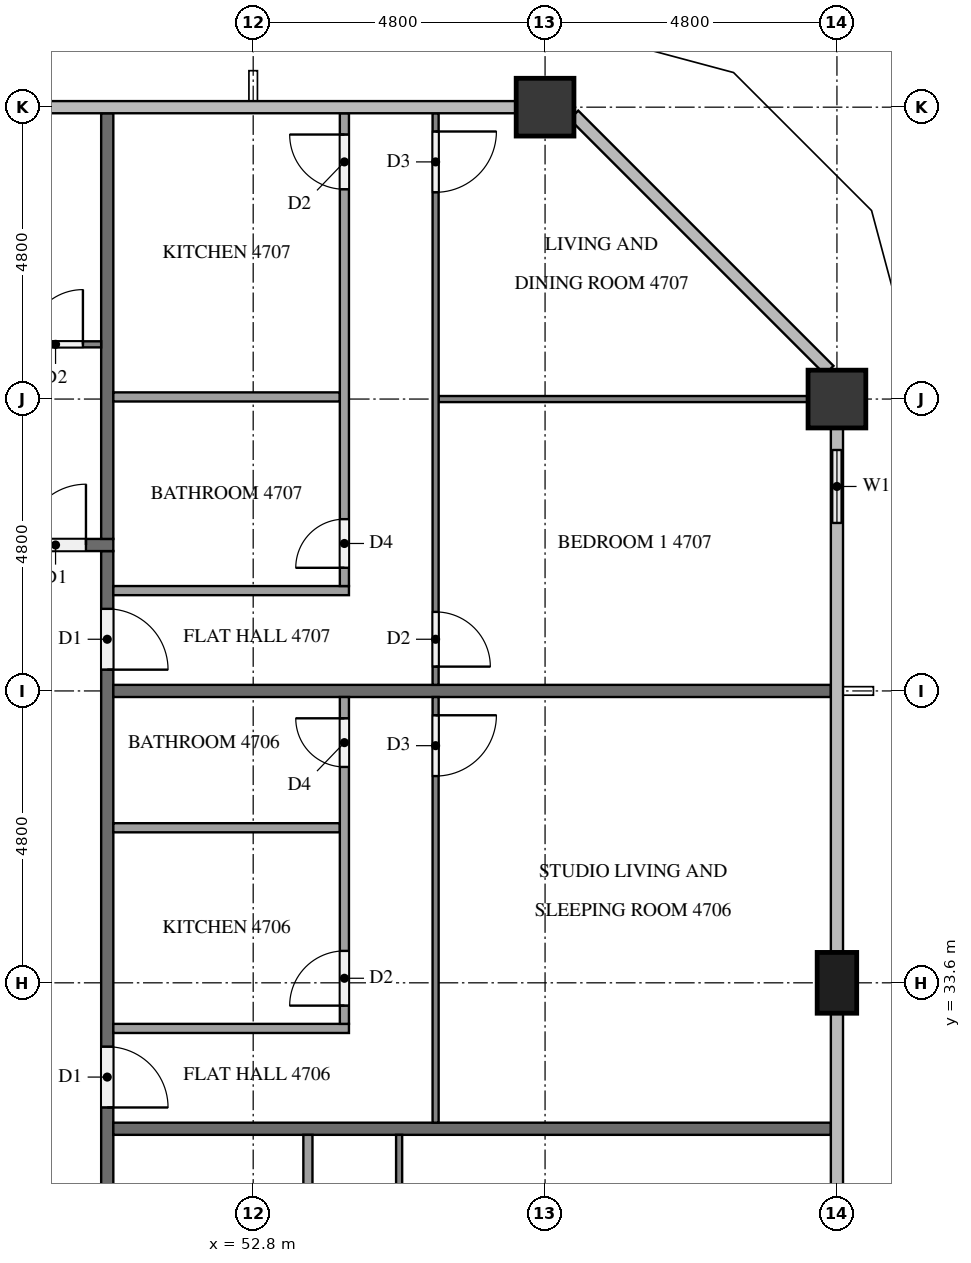
"""IFC4 building model, lengths in metres.
Left out: names, types, materials, properties, quantities, classifications, styles, units other than length and angle.
Written with IfcOpenShell. Run it as: python <this file> out.ifc"""

import sys

from ifc_helpers import new_model, si_unit, direction, frame, frame_2d, origin, origin_2d, place, context, subcontext, project, spatial, rectangle, extrude, element, fill, save


model = new_model("IFC4")
c1 = context("Model", 3, precision=1e-05, world=origin(), true_north=direction((0.0, 1.0)))
c2 = subcontext(c1, "Body", "Model", "MODEL_VIEW")
j1 = project(units=[si_unit("LENGTHUNIT", "METRE"), si_unit("PLANEANGLEUNIT", "RADIAN")], contexts=[c1])
p1 = place(None, origin())
s1 = spatial("IfcSite", under=j1, at=p1, CompositionType="ELEMENT")
p2 = place(p1, origin())
s2 = spatial("IfcBuilding", under=s1, at=p2, CompositionType="ELEMENT")
p3 = place(p2, frame((0.0, 0.0, 182.4)))
s3 = spatial("IfcBuildingStorey", under=s2, at=p3, CompositionType="ELEMENT", Elevation=182.4)
p4 = place(p3, frame((62.4, 33.6, 0.0), z_axis=(0.0, 0.0, 1.0), x_axis=(0.0, 1.0, 0.0)))
e1 = element("IfcColumn", 1, at=p4, inside=s3, PredefinedType="COLUMN", context=c2, shape_type="SweptSolid", body=[
    extrude(rectangle(XDim=1.0, YDim=0.65, at=origin_2d()), origin(), (0.0, 0.0, 1.0), 3.2),
])
for number, where, z_axis, x_axis in (
    (2, (62.4, 43.2, 0.0), (0.0, 0.0, 1.0), (1.0, 0.0, 0.0)),
    (3, (57.6, 48.0, 0.0), (0.0, 0.0, 1.0), (1.0, 0.0, 0.0)),
):
    element("IfcColumn", number, at=place(p3, frame(where, z_axis=z_axis, x_axis=x_axis)), inside=s3, PredefinedType="COLUMN", context=c2, shape_type="SweptSolid", body=[
        extrude(rectangle(XDim=0.95, YDim=0.95, at=origin_2d()), origin(), (0.0, 0.0, 1.0), 3.2),
    ])
p5 = place(p3, frame((62.4, 40.8, 0.0), z_axis=(0.0, 0.0, 1.0), x_axis=(0.0, 1.0, 0.0)))
e4 = element("IfcWall", 4, at=p5, inside=s3, PredefinedType="SOLIDWALL", context=c2, shape_type="SweptSolid", body=[
    extrude(rectangle(XDim=1.925, YDim=0.15, at=frame_2d((0.962, 0.0))), origin(), (0.0, 0.0, 1.0), 3.2),
])
p6 = place(p5, frame((0.363, 0.0, 0.9)))
e5 = element("IfcOpeningElement", 5, at=p6, cuts=e4, PredefinedType="OPENING", context=c2, shape_type="SweptSolid", body=[
    extrude(rectangle(XDim=1.2, YDim=1.4, at=frame_2d((0.6, 0.7))), frame((0.0, 0.085, 0.0), z_axis=(0.0, -1.0, 0.0), x_axis=(1.0, 0.0, 0.0)), (0.0, 0.0, 1.0), 0.17),
])
p7 = place(p3, frame((50.4, 40.7, 0.0), z_axis=(0.0, 0.0, 1.0), x_axis=(0.0, -1.0, 0.0)))
e6 = element("IfcWall", 6, at=p7, inside=s3, PredefinedType="PARTITIONING", context=c2, shape_type="SweptSolid", body=[
    extrude(rectangle(XDim=28.6, YDim=0.2, at=frame_2d((14.3, 0.0))), origin(), (0.0, 0.0, 1.0), 3.2),
])
p8 = place(p7, frame((27.3, 0.0, 0.0)))
e7 = element("IfcOpeningElement", 7, at=p8, cuts=e6, PredefinedType="OPENING", context=c2, shape_type="SweptSolid", body=[
    extrude(rectangle(XDim=1.1, YDim=2.1, at=frame_2d((0.55, 1.05))), frame((0.0, 0.11, 0.0), z_axis=(0.0, -1.0, 0.0), x_axis=(1.0, 0.0, 0.0)), (0.0, 0.0, 1.0), 0.22),
])
p9 = place(p7, frame((8.15, 0.0, 0.0)))
e8 = element("IfcOpeningElement", 8, at=p9, cuts=e6, PredefinedType="OPENING", context=c2, shape_type="SweptSolid", body=[
    extrude(rectangle(XDim=1.0, YDim=2.1, at=frame_2d((0.5, 1.05))), frame((0.0, 0.11, 0.0), z_axis=(0.0, -1.0, 0.0), x_axis=(1.0, 0.0, 0.0)), (0.0, 0.0, 1.0), 0.22),
])
p10 = place(p7, frame((0.95, 0.0, 0.0)))
e9 = element("IfcOpeningElement", 9, at=p10, cuts=e6, PredefinedType="OPENING", context=c2, shape_type="SweptSolid", body=[
    extrude(rectangle(XDim=1.0, YDim=2.1, at=frame_2d((0.5, 1.05))), frame((0.0, 0.11, 0.0), z_axis=(0.0, -1.0, 0.0), x_axis=(1.0, 0.0, 0.0)), (0.0, 0.0, 1.0), 0.22),
])
p11 = place(p3, frame((11.9, 40.8, 0.0), z_axis=(0.0, 0.0, 1.0), x_axis=(1.0, 0.0, 0.0)))
e10 = element("IfcWall", 10, at=p11, inside=s3, PredefinedType="PARTITIONING", context=c2, shape_type="SweptSolid", body=[
    extrude(rectangle(XDim=38.6, YDim=0.2, at=frame_2d((19.3, 0.0))), origin(), (0.0, 0.0, 1.0), 3.2),
])
p12 = place(p11, frame((37.15, 0.0, 0.0)))
e11 = element("IfcOpeningElement", 11, at=p12, cuts=e10, PredefinedType="OPENING", context=c2, shape_type="SweptSolid", body=[
    extrude(rectangle(XDim=1.0, YDim=2.1, at=frame_2d((0.5, 1.05))), frame((0.0, 0.11, 0.0), z_axis=(0.0, -1.0, 0.0), x_axis=(1.0, 0.0, 0.0)), (0.0, 0.0, 1.0), 0.22),
])
p13 = place(p11, frame((20.35, 0.0, 0.0)))
e12 = element("IfcOpeningElement", 12, at=p13, cuts=e10, PredefinedType="OPENING", context=c2, shape_type="SweptSolid", body=[
    extrude(rectangle(XDim=1.0, YDim=2.1, at=frame_2d((0.5, 1.05))), frame((0.0, 0.11, 0.0), z_axis=(0.0, -1.0, 0.0), x_axis=(1.0, 0.0, 0.0)), (0.0, 0.0, 1.0), 0.22),
])
p14 = place(p11, frame((13.15, 0.0, 0.0)))
e13 = element("IfcOpeningElement", 13, at=p14, cuts=e10, PredefinedType="OPENING", context=c2, shape_type="SweptSolid", body=[
    extrude(rectangle(XDim=1.0, YDim=2.1, at=frame_2d((0.5, 1.05))), frame((0.0, 0.11, 0.0), z_axis=(0.0, -1.0, 0.0), x_axis=(1.0, 0.0, 0.0)), (0.0, 0.0, 1.0), 0.22),
])
for number, where, z_axis, x_axis in (
    (14, (50.5, 31.2, 0.0), (0.0, 0.0, 1.0), (1.0, 0.0, 0.0)),
    (15, (50.5, 38.4, 0.0), (0.0, 0.0, 1.0), (1.0, 0.0, 0.0)),
):
    element("IfcWall", number, at=place(p3, frame(where, z_axis=z_axis, x_axis=x_axis)), inside=s3, PredefinedType="PARTITIONING", context=c2, shape_type="SweptSolid", body=[
        extrude(rectangle(XDim=11.8, YDim=0.2, at=frame_2d((5.9, 0.0))), origin(), (0.0, 0.0, 1.0), 3.2),
    ])
p15 = place(p3, frame((50.4, 40.9, 0.0), z_axis=(0.0, 0.0, 1.0), x_axis=(0.0, 1.0, 0.0)))
e16 = element("IfcWall", 16, at=p15, inside=s3, PredefinedType="PARTITIONING", context=c2, shape_type="SweptSolid", body=[
    extrude(rectangle(XDim=7.0, YDim=0.2, at=frame_2d((3.5, 0.0))), origin(), (0.0, 0.0, 1.0), 3.2),
])
p16 = place(p3, frame((55.2, 31.1, 0.0), z_axis=(0.0, 0.0, 1.0), x_axis=(0.0, -1.0, 0.0)))
e17 = element("IfcWall", 17, at=p16, inside=s3, PredefinedType="PARTITIONING", context=c2, shape_type="SweptSolid", body=[
    extrude(rectangle(XDim=19.0, YDim=0.1, at=frame_2d((9.5, 0.0))), origin(), (0.0, 0.0, 1.0), 3.2),
])
p17 = place(p16, frame((14.65, 0.0, 0.0)))
e18 = element("IfcOpeningElement", 18, at=p17, cuts=e17, PredefinedType="OPENING", context=c2, shape_type="SweptSolid", body=[
    extrude(rectangle(XDim=0.9, YDim=2.1, at=frame_2d((0.45, 1.05))), frame((0.0, 0.06, 0.0), z_axis=(0.0, -1.0, 0.0), x_axis=(1.0, 0.0, 0.0)), (0.0, 0.0, 1.0), 0.12),
])
p18 = place(p16, frame((12.95, 0.0, 0.0)))
e19 = element("IfcOpeningElement", 19, at=p18, cuts=e17, PredefinedType="OPENING", context=c2, shape_type="SweptSolid", body=[
    extrude(rectangle(XDim=1.0, YDim=2.1, at=frame_2d((0.5, 1.05))), frame((0.0, 0.06, 0.0), z_axis=(0.0, -1.0, 0.0), x_axis=(1.0, 0.0, 0.0)), (0.0, 0.0, 1.0), 0.12),
])
p19 = place(p16, frame((5.05, 0.0, 0.0)))
e20 = element("IfcOpeningElement", 20, at=p19, cuts=e17, PredefinedType="OPENING", context=c2, shape_type="SweptSolid", body=[
    extrude(rectangle(XDim=0.9, YDim=2.1, at=frame_2d((0.45, 1.05))), frame((0.0, 0.06, 0.0), z_axis=(0.0, -1.0, 0.0), x_axis=(1.0, 0.0, 0.0)), (0.0, 0.0, 1.0), 0.12),
])
p20 = place(p16, frame((3.45, 0.0, 0.0)))
e21 = element("IfcOpeningElement", 21, at=p20, cuts=e17, PredefinedType="OPENING", context=c2, shape_type="SweptSolid", body=[
    extrude(rectangle(XDim=0.9, YDim=2.1, at=frame_2d((0.45, 1.05))), frame((0.0, 0.06, 0.0), z_axis=(0.0, -1.0, 0.0), x_axis=(1.0, 0.0, 0.0)), (0.0, 0.0, 1.0), 0.12),
])
p21 = place(p3, frame((53.7, 13.725, 0.0), z_axis=(0.0, 0.0, 1.0), x_axis=(0.0, 1.0, 0.0)))
e22 = element("IfcWall", 22, at=p21, inside=s3, PredefinedType="PARTITIONING", context=c2, shape_type="SweptSolid", body=[
    extrude(rectangle(XDim=17.375, YDim=0.15, at=frame_2d((8.688, 0.0))), origin(), (0.0, 0.0, 1.0), 3.2),
])
p22 = place(p21, frame((2.133, 0.0, 0.0)))
e23 = element("IfcOpeningElement", 23, at=p22, cuts=e22, PredefinedType="OPENING", context=c2, shape_type="SweptSolid", body=[
    extrude(rectangle(XDim=0.8, YDim=2.1, at=frame_2d((0.4, 1.05))), frame((0.0, 0.085, 0.0), z_axis=(0.0, -1.0, 0.0), x_axis=(1.0, 0.0, 0.0)), (0.0, 0.0, 1.0), 0.17),
])
p23 = place(p21, frame((3.583, 0.0, 0.0)))
e24 = element("IfcOpeningElement", 24, at=p23, cuts=e22, PredefinedType="OPENING", context=c2, shape_type="SweptSolid", body=[
    extrude(rectangle(XDim=0.9, YDim=2.1, at=frame_2d((0.45, 1.05))), frame((0.0, 0.085, 0.0), z_axis=(0.0, -1.0, 0.0), x_axis=(1.0, 0.0, 0.0)), (0.0, 0.0, 1.0), 0.17),
])
p24 = place(p21, frame((12.892, 0.0, 0.0)))
e25 = element("IfcOpeningElement", 25, at=p24, cuts=e22, PredefinedType="OPENING", context=c2, shape_type="SweptSolid", body=[
    extrude(rectangle(XDim=0.9, YDim=2.1, at=frame_2d((0.45, 1.05))), frame((0.0, 0.085, 0.0), z_axis=(0.0, -1.0, 0.0), x_axis=(1.0, 0.0, 0.0)), (0.0, 0.0, 1.0), 0.17),
])
p25 = place(p21, frame((14.442, 0.0, 0.0)))
e26 = element("IfcOpeningElement", 26, at=p25, cuts=e22, PredefinedType="OPENING", context=c2, shape_type="SweptSolid", body=[
    extrude(rectangle(XDim=0.8, YDim=2.1, at=frame_2d((0.4, 1.05))), frame((0.0, 0.085, 0.0), z_axis=(0.0, -1.0, 0.0), x_axis=(1.0, 0.0, 0.0)), (0.0, 0.0, 1.0), 0.17),
])
p26 = place(p3, frame((55.8, 38.3, 0.0), z_axis=(0.0, 0.0, 1.0), x_axis=(0.0, -1.0, 0.0)))
e27 = element("IfcWall", 27, at=p26, inside=s3, PredefinedType="PARTITIONING", context=c2, shape_type="SweptSolid", body=[
    extrude(rectangle(XDim=7.0, YDim=0.1, at=frame_2d((3.5, 0.0))), origin(), (0.0, 0.0, 1.0), 3.2),
])
p27 = place(p26, frame((0.3, 0.0, 0.0)))
e28 = element("IfcOpeningElement", 28, at=p27, cuts=e27, PredefinedType="OPENING", context=c2, shape_type="SweptSolid", body=[
    extrude(rectangle(XDim=1.0, YDim=2.1, at=frame_2d((0.5, 1.05))), frame((0.0, 0.06, 0.0), z_axis=(0.0, -1.0, 0.0), x_axis=(1.0, 0.0, 0.0)), (0.0, 0.0, 1.0), 0.12),
])
p28 = place(p3, frame((50.5, 36.15, 0.0), z_axis=(0.0, 0.0, 1.0), x_axis=(1.0, 0.0, 0.0)))
e29 = element("IfcWall", 29, at=p28, inside=s3, PredefinedType="PARTITIONING", context=c2, shape_type="SweptSolid", body=[
    extrude(rectangle(XDim=3.725, YDim=0.15, at=frame_2d((1.863, 0.0))), origin(), (0.0, 0.0, 1.0), 3.2),
])
p29 = place(p3, frame((50.5, 32.85, 0.0), z_axis=(0.0, 0.0, 1.0), x_axis=(1.0, 0.0, 0.0)))
e30 = element("IfcWall", 30, at=p29, inside=s3, PredefinedType="PARTITIONING", context=c2, shape_type="SweptSolid", body=[
    extrude(rectangle(XDim=3.875, YDim=0.15, at=frame_2d((1.938, 0.0))), origin(), (0.0, 0.0, 1.0), 3.2),
])
p30 = place(p3, frame((54.3, 32.925, 0.0), z_axis=(0.0, 0.0, 1.0), x_axis=(0.0, 1.0, 0.0)))
e31 = element("IfcWall", 31, at=p30, inside=s3, PredefinedType="PARTITIONING", context=c2, shape_type="SweptSolid", body=[
    extrude(rectangle(XDim=5.375, YDim=0.15, at=frame_2d((2.688, 0.0))), origin(), (0.0, 0.0, 1.0), 3.2),
])
p31 = place(p30, frame((0.3, 0.0, 0.0)))
e32 = element("IfcOpeningElement", 32, at=p31, cuts=e31, PredefinedType="OPENING", context=c2, shape_type="SweptSolid", body=[
    extrude(rectangle(XDim=0.9, YDim=2.1, at=frame_2d((0.45, 1.05))), frame((0.0, 0.085, 0.0), z_axis=(0.0, -1.0, 0.0), x_axis=(1.0, 0.0, 0.0)), (0.0, 0.0, 1.0), 0.17),
])
p32 = place(p30, frame((4.225, 0.0, 0.0)))
e33 = element("IfcOpeningElement", 33, at=p32, cuts=e31, PredefinedType="OPENING", context=c2, shape_type="SweptSolid", body=[
    extrude(rectangle(XDim=0.8, YDim=2.1, at=frame_2d((0.4, 1.05))), frame((0.0, 0.085, 0.0), z_axis=(0.0, -1.0, 0.0), x_axis=(1.0, 0.0, 0.0)), (0.0, 0.0, 1.0), 0.17),
])
p33 = place(p3, frame((55.85, 43.2, 0.0), z_axis=(0.0, 0.0, 1.0), x_axis=(1.0, 0.0, 0.0)))
e34 = element("IfcWall", 34, at=p33, inside=s3, PredefinedType="PARTITIONING", context=c2, shape_type="SweptSolid", body=[
    extrude(rectangle(XDim=6.075, YDim=0.1, at=frame_2d((3.038, 0.0))), origin(), (0.0, 0.0, 1.0), 3.2),
])
p34 = place(p3, frame((55.8, 47.9, 0.0), z_axis=(0.0, 0.0, 1.0), x_axis=(0.0, -1.0, 0.0)))
e35 = element("IfcWall", 35, at=p34, inside=s3, PredefinedType="PARTITIONING", context=c2, shape_type="SweptSolid", body=[
    extrude(rectangle(XDim=9.4, YDim=0.1, at=frame_2d((4.7, 0.0))), origin(), (0.0, 0.0, 1.0), 3.2),
])
p35 = place(p34, frame((8.2, 0.0, 0.0)))
e36 = element("IfcOpeningElement", 36, at=p35, cuts=e35, PredefinedType="OPENING", context=c2, shape_type="SweptSolid", body=[
    extrude(rectangle(XDim=0.9, YDim=2.1, at=frame_2d((0.45, 1.05))), frame((0.0, 0.06, 0.0), z_axis=(0.0, -1.0, 0.0), x_axis=(1.0, 0.0, 0.0)), (0.0, 0.0, 1.0), 0.12),
])
p36 = place(p34, frame((0.3, 0.0, 0.0)))
e37 = element("IfcOpeningElement", 37, at=p36, cuts=e35, PredefinedType="OPENING", context=c2, shape_type="SweptSolid", body=[
    extrude(rectangle(XDim=1.0, YDim=2.1, at=frame_2d((0.5, 1.05))), frame((0.0, 0.06, 0.0), z_axis=(0.0, -1.0, 0.0), x_axis=(1.0, 0.0, 0.0)), (0.0, 0.0, 1.0), 0.12),
])
p37 = place(p3, frame((50.5, 43.235, 0.0), z_axis=(0.0, 0.0, 1.0), x_axis=(1.0, 0.0, 0.0)))
e38 = element("IfcWall", 38, at=p37, inside=s3, PredefinedType="PARTITIONING", context=c2, shape_type="SweptSolid", body=[
    extrude(rectangle(XDim=3.725, YDim=0.15, at=frame_2d((1.863, 0.0))), origin(), (0.0, 0.0, 1.0), 3.2),
])
p38 = place(p3, frame((50.5, 40.05, 0.0), z_axis=(0.0, 0.0, 1.0), x_axis=(1.0, 0.0, 0.0)))
e39 = element("IfcWall", 39, at=p38, inside=s3, PredefinedType="PARTITIONING", context=c2, shape_type="SweptSolid", body=[
    extrude(rectangle(XDim=3.875, YDim=0.15, at=frame_2d((1.938, 0.0))), origin(), (0.0, 0.0, 1.0), 3.2),
])
p39 = place(p3, frame((54.3, 40.125, 0.0), z_axis=(0.0, 0.0, 1.0), x_axis=(0.0, 1.0, 0.0)))
e40 = element("IfcWall", 40, at=p39, inside=s3, PredefinedType="PARTITIONING", context=c2, shape_type="SweptSolid", body=[
    extrude(rectangle(XDim=7.775, YDim=0.15, at=frame_2d((3.887, 0.0))), origin(), (0.0, 0.0, 1.0), 3.2),
])
p40 = place(p39, frame((0.3, 0.0, 0.0)))
e41 = element("IfcOpeningElement", 41, at=p40, cuts=e40, PredefinedType="OPENING", context=c2, shape_type="SweptSolid", body=[
    extrude(rectangle(XDim=0.8, YDim=2.1, at=frame_2d((0.4, 1.05))), frame((0.0, 0.085, 0.0), z_axis=(0.0, -1.0, 0.0), x_axis=(1.0, 0.0, 0.0)), (0.0, 0.0, 1.0), 0.17),
])
p41 = place(p39, frame((6.525, 0.0, 0.0)))
e42 = element("IfcOpeningElement", 42, at=p41, cuts=e40, PredefinedType="OPENING", context=c2, shape_type="SweptSolid", body=[
    extrude(rectangle(XDim=0.9, YDim=2.1, at=frame_2d((0.45, 1.05))), frame((0.0, 0.085, 0.0), z_axis=(0.0, -1.0, 0.0), x_axis=(1.0, 0.0, 0.0)), (0.0, 0.0, 1.0), 0.17),
])
p42 = place(p3, frame((33.7, 44.1, 0.0), z_axis=(0.0, 0.0, 1.0), x_axis=(1.0, 0.0, 0.0)))
e43 = element("IfcWall", 43, at=p42, inside=s3, PredefinedType="PARTITIONING", context=c2, shape_type="SweptSolid", body=[
    extrude(rectangle(XDim=16.6, YDim=0.1, at=frame_2d((8.3, 0.0))), origin(), (0.0, 0.0, 1.0), 3.2),
])
p43 = place(p42, frame((15.4, 0.0, 0.0)))
e44 = element("IfcOpeningElement", 44, at=p43, cuts=e43, PredefinedType="OPENING", context=c2, shape_type="SweptSolid", body=[
    extrude(rectangle(XDim=0.9, YDim=2.1, at=frame_2d((0.45, 1.05))), frame((0.0, 0.06, 0.0), z_axis=(0.0, -1.0, 0.0), x_axis=(1.0, 0.0, 0.0)), (0.0, 0.0, 1.0), 0.12),
])
p44 = place(p42, frame((7.45, 0.0, 0.0)))
e45 = element("IfcOpeningElement", 45, at=p44, cuts=e43, PredefinedType="OPENING", context=c2, shape_type="SweptSolid", body=[
    extrude(rectangle(XDim=0.9, YDim=2.1, at=frame_2d((0.45, 1.05))), frame((0.0, 0.06, 0.0), z_axis=(0.0, -1.0, 0.0), x_axis=(1.0, 0.0, 0.0)), (0.0, 0.0, 1.0), 0.12),
])
p45 = place(p42, frame((5.75, 0.0, 0.0)))
e46 = element("IfcOpeningElement", 46, at=p45, cuts=e43, PredefinedType="OPENING", context=c2, shape_type="SweptSolid", body=[
    extrude(rectangle(XDim=1.0, YDim=2.1, at=frame_2d((0.5, 1.05))), frame((0.0, 0.06, 0.0), z_axis=(0.0, -1.0, 0.0), x_axis=(1.0, 0.0, 0.0)), (0.0, 0.0, 1.0), 0.12),
])
p46 = place(p6, origin())
e47 = element("IfcWindow", 47, at=p46, inside=s3, PartitioningType="SINGLE_PANEL", PredefinedType="WINDOW", context=c2, shape_type="SweptSolid", body=[
    extrude(rectangle(XDim=1.2, YDim=1.4, at=frame_2d((0.6, 0.7))), frame((0.0, 0.03, 0.0), z_axis=(0.0, -1.0, 0.0), x_axis=(1.0, 0.0, 0.0)), (0.0, 0.0, 1.0), 0.06),
])
fill(e5, e47)
p47 = place(p9, origin())
e48 = element("IfcDoor", 48, at=p47, inside=s3, OperationType="SINGLE_SWING_RIGHT", PredefinedType="DOOR", context=c2, shape_type="SweptSolid", body=[
    extrude(rectangle(XDim=1.0, YDim=2.1, at=frame_2d((0.5, 1.05))), frame((0.0, 0.025, 0.0), z_axis=(0.0, -1.0, 0.0), x_axis=(1.0, 0.0, 0.0)), (0.0, 0.0, 1.0), 0.05),
])
fill(e8, e48)
p48 = place(p10, origin())
e49 = element("IfcDoor", 49, at=p48, inside=s3, OperationType="SINGLE_SWING_RIGHT", PredefinedType="DOOR", context=c2, shape_type="SweptSolid", body=[
    extrude(rectangle(XDim=1.0, YDim=2.1, at=frame_2d((0.5, 1.05))), frame((0.0, 0.025, 0.0), z_axis=(0.0, -1.0, 0.0), x_axis=(1.0, 0.0, 0.0)), (0.0, 0.0, 1.0), 0.05),
])
fill(e9, e49)
p49 = place(p12, origin())
e50 = element("IfcDoor", 50, at=p49, inside=s3, OperationType="SINGLE_SWING_RIGHT", PredefinedType="DOOR", context=c2, shape_type="SweptSolid", body=[
    extrude(rectangle(XDim=1.0, YDim=2.1, at=frame_2d((0.5, 1.05))), frame((0.0, 0.025, 0.0), z_axis=(0.0, -1.0, 0.0), x_axis=(1.0, 0.0, 0.0)), (0.0, 0.0, 1.0), 0.05),
])
fill(e11, e50)
p50 = place(p27, origin())
e51 = element("IfcDoor", 51, at=p50, inside=s3, OperationType="SINGLE_SWING_LEFT", PredefinedType="DOOR", context=c2, shape_type="SweptSolid", body=[
    extrude(rectangle(XDim=1.0, YDim=2.1, at=frame_2d((0.5, 1.05))), frame((0.0, 0.025, 0.0), z_axis=(0.0, -1.0, 0.0), x_axis=(1.0, 0.0, 0.0)), (0.0, 0.0, 1.0), 0.05),
])
fill(e28, e51)
p51 = place(p31, origin())
e52 = element("IfcDoor", 52, at=p51, inside=s3, OperationType="SINGLE_SWING_LEFT", PredefinedType="DOOR", context=c2, shape_type="SweptSolid", body=[
    extrude(rectangle(XDim=0.9, YDim=2.1, at=frame_2d((0.45, 1.05))), frame((0.0, 0.025, 0.0), z_axis=(0.0, -1.0, 0.0), x_axis=(1.0, 0.0, 0.0)), (0.0, 0.0, 1.0), 0.05),
])
fill(e32, e52)
p52 = place(p32, origin())
e53 = element("IfcDoor", 53, at=p52, inside=s3, OperationType="SINGLE_SWING_RIGHT", PredefinedType="DOOR", context=c2, shape_type="SweptSolid", body=[
    extrude(rectangle(XDim=0.8, YDim=2.1, at=frame_2d((0.4, 1.05))), frame((0.0, 0.025, 0.0), z_axis=(0.0, -1.0, 0.0), x_axis=(1.0, 0.0, 0.0)), (0.0, 0.0, 1.0), 0.05),
])
fill(e33, e53)
p53 = place(p35, origin())
e54 = element("IfcDoor", 54, at=p53, inside=s3, OperationType="SINGLE_SWING_RIGHT", PredefinedType="DOOR", context=c2, shape_type="SweptSolid", body=[
    extrude(rectangle(XDim=0.9, YDim=2.1, at=frame_2d((0.45, 1.05))), frame((0.0, 0.025, 0.0), z_axis=(0.0, -1.0, 0.0), x_axis=(1.0, 0.0, 0.0)), (0.0, 0.0, 1.0), 0.05),
])
fill(e36, e54)
p54 = place(p36, origin())
e55 = element("IfcDoor", 55, at=p54, inside=s3, OperationType="SINGLE_SWING_LEFT", PredefinedType="DOOR", context=c2, shape_type="SweptSolid", body=[
    extrude(rectangle(XDim=1.0, YDim=2.1, at=frame_2d((0.5, 1.05))), frame((0.0, 0.025, 0.0), z_axis=(0.0, -1.0, 0.0), x_axis=(1.0, 0.0, 0.0)), (0.0, 0.0, 1.0), 0.05),
])
fill(e37, e55)
p55 = place(p40, origin())
e56 = element("IfcDoor", 56, at=p55, inside=s3, OperationType="SINGLE_SWING_LEFT", PredefinedType="DOOR", context=c2, shape_type="SweptSolid", body=[
    extrude(rectangle(XDim=0.8, YDim=2.1, at=frame_2d((0.4, 1.05))), frame((0.0, 0.025, 0.0), z_axis=(0.0, -1.0, 0.0), x_axis=(1.0, 0.0, 0.0)), (0.0, 0.0, 1.0), 0.05),
])
fill(e41, e56)
p56 = place(p41, origin())
e57 = element("IfcDoor", 57, at=p56, inside=s3, OperationType="SINGLE_SWING_RIGHT", PredefinedType="DOOR", context=c2, shape_type="SweptSolid", body=[
    extrude(rectangle(XDim=0.9, YDim=2.1, at=frame_2d((0.45, 1.05))), frame((0.0, 0.025, 0.0), z_axis=(0.0, -1.0, 0.0), x_axis=(1.0, 0.0, 0.0)), (0.0, 0.0, 1.0), 0.05),
])
fill(e42, e57)
p57 = place(p43, origin())
e58 = element("IfcDoor", 58, at=p57, inside=s3, OperationType="SINGLE_SWING_RIGHT", PredefinedType="DOOR", context=c2, shape_type="SweptSolid", body=[
    extrude(rectangle(XDim=0.9, YDim=2.1, at=frame_2d((0.45, 1.05))), frame((0.0, 0.025, 0.0), z_axis=(0.0, -1.0, 0.0), x_axis=(1.0, 0.0, 0.0)), (0.0, 0.0, 1.0), 0.05),
])
fill(e44, e58)
save(model, sys.argv[1])
